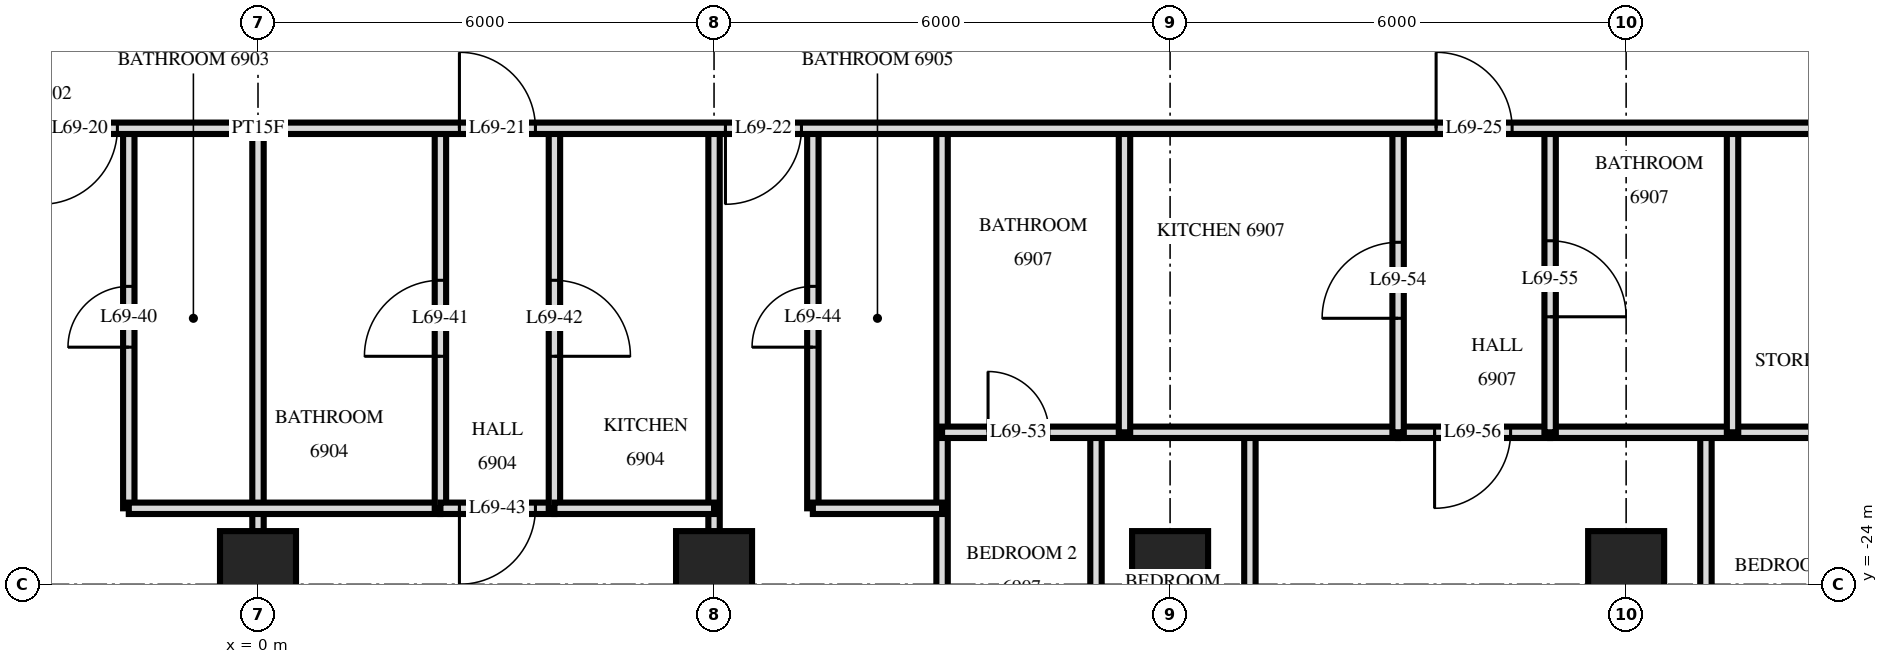
"""IFC4 building model, lengths in metres.
Left out: names, types, materials, properties, quantities, classifications, styles, units other than length and angle.
Written with IfcOpenShell. Run it as: python <this file> out.ifc"""

import sys

from ifc_helpers import new_model, si_unit, direction, frame, frame_2d, origin, origin_2d, place, context, subcontext, project, spatial, rectangle, extrude, element, fill, save


model = new_model("IFC4")
c1 = context("Model", 3, precision=1e-05, world=origin(), true_north=direction((0.0, 1.0)))
c2 = subcontext(c1, "Body", "Model", "MODEL_VIEW")
j1 = project(units=[si_unit("LENGTHUNIT", "METRE"), si_unit("PLANEANGLEUNIT", "RADIAN")], contexts=[c1])
p1 = place(None, origin())
s1 = spatial("IfcSite", under=j1, at=p1, CompositionType="ELEMENT")
p2 = place(p1, origin())
s2 = spatial("IfcBuilding", under=s1, at=p2, CompositionType="ELEMENT")
p3 = place(p2, frame((0.0, 0.0, 263.1)))
s3 = spatial("IfcBuildingStorey", under=s2, at=p3, CompositionType="ELEMENT", Elevation=263.1)
for number, where, z_axis, x_axis in (
    (1, (0.0, -23.8, 0.0), (0.0, 0.0, 1.0), (1.0, 0.0, 0.0)),
    (2, (6.0, -23.8, 0.0), (0.0, 0.0, 1.0), (1.0, 0.0, 0.0)),
    (3, (12.0, -23.8, 0.0), (0.0, 0.0, 1.0), (1.0, 0.0, 0.0)),
    (4, (18.0, -23.8, 0.0), (0.0, 0.0, 1.0), (1.0, 0.0, 0.0)),
):
    element("IfcColumn", number, at=place(p3, frame(where, z_axis=z_axis, x_axis=x_axis)), inside=s3, PredefinedType="COLUMN", context=c2, shape_type="SweptSolid", body=[
        extrude(rectangle(XDim=1.0, YDim=1.0, at=origin_2d()), origin(), (0.0, 0.0, 1.0), 3.5),
    ])
p4 = place(p3, frame((19.4, -22.0, 0.0), z_axis=(0.0, 0.0, 1.0), x_axis=(0.0, 1.0, 0.0)))
e5 = element("IfcWall", 5, at=p4, inside=s3, PredefinedType="PARTITIONING", context=c2, shape_type="SweptSolid", body=[
    extrude(rectangle(XDim=4.0, YDim=0.15, at=frame_2d((2.0, 0.0))), origin(), (0.0, 0.0, 1.0), 3.22),
])
p5 = place(p3, frame((19.05, -33.527, 0.0), z_axis=(0.0, 0.0, 1.0), x_axis=(0.0, 1.0, 0.0)))
e6 = element("IfcWall", 6, at=p5, inside=s3, PredefinedType="PARTITIONING", context=c2, shape_type="SweptSolid", body=[
    extrude(rectangle(XDim=11.527, YDim=0.15, at=frame_2d((5.764, 0.0))), origin(), (0.0, 0.0, 1.0), 3.22),
])
p6 = place(p5, frame((5.207, 0.0, 0.0)))
e7 = element("IfcOpeningElement", 7, at=p6, cuts=e6, PredefinedType="OPENING", context=c2, shape_type="SweptSolid", body=[
    extrude(rectangle(XDim=0.9, YDim=2.1, at=frame_2d((0.45, 1.05))), frame((0.0, 0.085, 0.0), z_axis=(0.0, -1.0, 0.0), x_axis=(1.0, 0.0, 0.0)), (0.0, 0.0, 1.0), 0.17),
])
p7 = place(p3, frame((17.0, -22.0, 0.0), z_axis=(0.0, 0.0, 1.0), x_axis=(0.0, 1.0, 0.0)))
e8 = element("IfcWall", 8, at=p7, inside=s3, PredefinedType="PARTITIONING", context=c2, shape_type="SweptSolid", body=[
    extrude(rectangle(XDim=4.0, YDim=0.15, at=frame_2d((2.0, 0.0))), origin(), (0.0, 0.0, 1.0), 3.22),
])
p8 = place(p7, frame((1.52, 0.0, 0.0)))
e9 = element("IfcOpeningElement", 9, at=p8, cuts=e8, PredefinedType="OPENING", context=c2, shape_type="SweptSolid", body=[
    extrude(rectangle(XDim=1.0, YDim=2.1, at=frame_2d((0.5, 1.05))), frame((0.0, 0.085, 0.0), z_axis=(0.0, -1.0, 0.0), x_axis=(1.0, 0.0, 0.0)), (0.0, 0.0, 1.0), 0.17),
])
p9 = place(p3, frame((15.0, -22.0, 0.0), z_axis=(0.0, 0.0, 1.0), x_axis=(0.0, 1.0, 0.0)))
e10 = element("IfcWall", 10, at=p9, inside=s3, PredefinedType="PARTITIONING", context=c2, shape_type="SweptSolid", body=[
    extrude(rectangle(XDim=4.0, YDim=0.15, at=frame_2d((2.0, 0.0))), origin(), (0.0, 0.0, 1.0), 3.22),
])
p10 = place(p9, frame((1.5, 0.0, 0.0)))
e11 = element("IfcOpeningElement", 11, at=p10, cuts=e10, PredefinedType="OPENING", context=c2, shape_type="SweptSolid", body=[
    extrude(rectangle(XDim=1.0, YDim=2.1, at=frame_2d((0.5, 1.05))), frame((0.0, 0.085, 0.0), z_axis=(0.0, -1.0, 0.0), x_axis=(1.0, 0.0, 0.0)), (0.0, 0.0, 1.0), 0.17),
])
p11 = place(p3, frame((13.05, -33.62, 0.0), z_axis=(0.0, 0.0, 1.0), x_axis=(0.0, 1.0, 0.0)))
e12 = element("IfcWall", 12, at=p11, inside=s3, PredefinedType="PARTITIONING", context=c2, shape_type="SweptSolid", body=[
    extrude(rectangle(XDim=11.62, YDim=0.15, at=frame_2d((5.81, 0.0))), origin(), (0.0, 0.0, 1.0), 3.22),
])
p12 = place(p11, frame((5.29, 0.0, 0.0)))
e13 = element("IfcOpeningElement", 13, at=p12, cuts=e12, PredefinedType="OPENING", context=c2, shape_type="SweptSolid", body=[
    extrude(rectangle(XDim=0.9, YDim=2.1, at=frame_2d((0.45, 1.05))), frame((0.0, 0.085, 0.0), z_axis=(0.0, -1.0, 0.0), x_axis=(1.0, 0.0, 0.0)), (0.0, 0.0, 1.0), 0.17),
])
p13 = place(p3, frame((11.4, -22.0, 0.0), z_axis=(0.0, 0.0, 1.0), x_axis=(0.0, 1.0, 0.0)))
e14 = element("IfcWall", 14, at=p13, inside=s3, PredefinedType="PARTITIONING", context=c2, shape_type="SweptSolid", body=[
    extrude(rectangle(XDim=4.0, YDim=0.15, at=frame_2d((2.0, 0.0))), origin(), (0.0, 0.0, 1.0), 3.22),
])
p14 = place(p3, frame((11.025, -33.62, 0.0), z_axis=(0.0, 0.0, 1.0), x_axis=(0.0, 1.0, 0.0)))
e15 = element("IfcWall", 15, at=p14, inside=s3, PredefinedType="PARTITIONING", context=c2, shape_type="SweptSolid", body=[
    extrude(rectangle(XDim=11.62, YDim=0.15, at=frame_2d((5.81, 0.0))), origin(), (0.0, 0.0, 1.0), 3.22),
])
p15 = place(p14, frame((5.29, 0.0, 0.0)))
e16 = element("IfcOpeningElement", 16, at=p15, cuts=e15, PredefinedType="OPENING", context=c2, shape_type="SweptSolid", body=[
    extrude(rectangle(XDim=0.9, YDim=2.1, at=frame_2d((0.45, 1.05))), frame((0.0, 0.085, 0.0), z_axis=(0.0, -1.0, 0.0), x_axis=(1.0, 0.0, 0.0)), (0.0, 0.0, 1.0), 0.17),
])
p16 = place(p3, frame((9.0, -33.62, 0.0), z_axis=(0.0, 0.0, 1.0), x_axis=(0.0, 1.0, 0.0)))
e17 = element("IfcWall", 17, at=p16, inside=s3, PredefinedType="PARTITIONING", context=c2, shape_type="SweptSolid", body=[
    extrude(rectangle(XDim=15.62, YDim=0.15, at=frame_2d((7.81, 0.0))), origin(), (0.0, 0.0, 1.0), 3.22),
])
p17 = place(p3, frame((7.3, -23.0, 0.0), z_axis=(0.0, 0.0, 1.0), x_axis=(0.0, 1.0, 0.0)))
e18 = element("IfcWall", 18, at=p17, inside=s3, PredefinedType="PARTITIONING", context=c2, shape_type="SweptSolid", body=[
    extrude(rectangle(XDim=5.0, YDim=0.15, at=frame_2d((2.5, 0.0))), origin(), (0.0, 0.0, 1.0), 3.22),
])
p18 = place(p17, frame((2.12, 0.0, 0.0)))
e19 = element("IfcOpeningElement", 19, at=p18, cuts=e18, PredefinedType="OPENING", context=c2, shape_type="SweptSolid", body=[
    extrude(rectangle(XDim=0.8, YDim=2.1, at=frame_2d((0.4, 1.05))), frame((0.0, 0.085, 0.0), z_axis=(0.0, -1.0, 0.0), x_axis=(1.0, 0.0, 0.0)), (0.0, 0.0, 1.0), 0.17),
])
p19 = place(p3, frame((6.0, -33.62, 0.0), z_axis=(0.0, 0.0, 1.0), x_axis=(0.0, 1.0, 0.0)))
e20 = element("IfcWall", 20, at=p19, inside=s3, PredefinedType="PARTITIONING", context=c2, shape_type="SweptSolid", body=[
    extrude(rectangle(XDim=15.62, YDim=0.15, at=frame_2d((7.81, 0.0))), origin(), (0.0, 0.0, 1.0), 3.22),
])
p20 = place(p3, frame((3.9, -23.0, 0.0), z_axis=(0.0, 0.0, 1.0), x_axis=(0.0, 1.0, 0.0)))
e21 = element("IfcWall", 21, at=p20, inside=s3, PredefinedType="PARTITIONING", context=c2, shape_type="SweptSolid", body=[
    extrude(rectangle(XDim=5.0, YDim=0.15, at=frame_2d((2.5, 0.0))), origin(), (0.0, 0.0, 1.0), 3.22),
])
p21 = place(p20, frame((2.0, 0.0, 0.0)))
e22 = element("IfcOpeningElement", 22, at=p21, cuts=e21, PredefinedType="OPENING", context=c2, shape_type="SweptSolid", body=[
    extrude(rectangle(XDim=1.0, YDim=2.1, at=frame_2d((0.5, 1.05))), frame((0.0, 0.085, 0.0), z_axis=(0.0, -1.0, 0.0), x_axis=(1.0, 0.0, 0.0)), (0.0, 0.0, 1.0), 0.17),
])
p22 = place(p3, frame((2.4, -23.0, 0.0), z_axis=(0.0, 0.0, 1.0), x_axis=(0.0, 1.0, 0.0)))
e23 = element("IfcWall", 23, at=p22, inside=s3, PredefinedType="PARTITIONING", context=c2, shape_type="SweptSolid", body=[
    extrude(rectangle(XDim=5.0, YDim=0.15, at=frame_2d((2.5, 0.0))), origin(), (0.0, 0.0, 1.0), 3.22),
])
p23 = place(p22, frame((2.0, 0.0, 0.0)))
e24 = element("IfcOpeningElement", 24, at=p23, cuts=e23, PredefinedType="OPENING", context=c2, shape_type="SweptSolid", body=[
    extrude(rectangle(XDim=1.0, YDim=2.1, at=frame_2d((0.5, 1.05))), frame((0.0, 0.085, 0.0), z_axis=(0.0, -1.0, 0.0), x_axis=(1.0, 0.0, 0.0)), (0.0, 0.0, 1.0), 0.17),
])
p24 = place(p3, frame((0.0, -33.62, 0.0), z_axis=(0.0, 0.0, 1.0), x_axis=(0.0, 1.0, 0.0)))
e25 = element("IfcWall", 25, at=p24, inside=s3, PredefinedType="PARTITIONING", context=c2, shape_type="SweptSolid", body=[
    extrude(rectangle(XDim=15.62, YDim=0.15, at=frame_2d((7.81, 0.0))), origin(), (0.0, 0.0, 1.0), 3.22),
])
p25 = place(p3, frame((-1.7, -23.0, 0.0), z_axis=(0.0, 0.0, 1.0), x_axis=(0.0, 1.0, 0.0)))
e26 = element("IfcWall", 26, at=p25, inside=s3, PredefinedType="PARTITIONING", context=c2, shape_type="SweptSolid", body=[
    extrude(rectangle(XDim=5.0, YDim=0.15, at=frame_2d((2.5, 0.0))), origin(), (0.0, 0.0, 1.0), 3.22),
])
p26 = place(p25, frame((2.12, 0.0, 0.0)))
e27 = element("IfcOpeningElement", 27, at=p26, cuts=e26, PredefinedType="OPENING", context=c2, shape_type="SweptSolid", body=[
    extrude(rectangle(XDim=0.8, YDim=2.1, at=frame_2d((0.4, 1.05))), frame((0.0, 0.085, 0.0), z_axis=(0.0, -1.0, 0.0), x_axis=(1.0, 0.0, 0.0)), (0.0, 0.0, 1.0), 0.17),
])
p27 = place(p3, frame((2.4, -23.0, 0.0), z_axis=(0.0, 0.0, 1.0), x_axis=(1.0, 0.0, 0.0)))
e28 = element("IfcWall", 28, at=p27, inside=s3, PredefinedType="PARTITIONING", context=c2, shape_type="SweptSolid", body=[
    extrude(rectangle(XDim=1.5, YDim=0.15, at=frame_2d((0.75, 0.0))), origin(), (0.0, 0.0, 1.0), 3.22),
])
p28 = place(p27, frame((0.25, 0.0, 0.0)))
e29 = element("IfcOpeningElement", 29, at=p28, cuts=e28, PredefinedType="OPENING", context=c2, shape_type="SweptSolid", body=[
    extrude(rectangle(XDim=1.0, YDim=2.1, at=frame_2d((0.5, 1.05))), frame((0.0, 0.085, 0.0), z_axis=(0.0, -1.0, 0.0), x_axis=(1.0, 0.0, 0.0)), (0.0, 0.0, 1.0), 0.17),
])
p29 = place(p3, frame((-1.7, -23.0, 0.0), z_axis=(0.0, 0.0, 1.0), x_axis=(1.0, 0.0, 0.0)))
e30 = element("IfcWall", 30, at=p29, inside=s3, PredefinedType="PARTITIONING", context=c2, shape_type="SweptSolid", body=[
    extrude(rectangle(XDim=4.1, YDim=0.15, at=frame_2d((2.05, 0.0))), origin(), (0.0, 0.0, 1.0), 3.22),
])
p30 = place(p3, frame((3.9, -23.0, 0.0), z_axis=(0.0, 0.0, 1.0), x_axis=(1.0, 0.0, 0.0)))
e31 = element("IfcWall", 31, at=p30, inside=s3, PredefinedType="PARTITIONING", context=c2, shape_type="SweptSolid", body=[
    extrude(rectangle(XDim=2.1, YDim=0.15, at=frame_2d((1.05, 0.0))), origin(), (0.0, 0.0, 1.0), 3.22),
])
p31 = place(p3, frame((7.3, -23.0, 0.0), z_axis=(0.0, 0.0, 1.0), x_axis=(1.0, 0.0, 0.0)))
e32 = element("IfcWall", 32, at=p31, inside=s3, PredefinedType="PARTITIONING", context=c2, shape_type="SweptSolid", body=[
    extrude(rectangle(XDim=1.7, YDim=0.15, at=frame_2d((0.85, 0.0))), origin(), (0.0, 0.0, 1.0), 3.22),
])
p32 = place(p3, frame((15.0, -22.0, 0.0), z_axis=(0.0, 0.0, 1.0), x_axis=(1.0, 0.0, 0.0)))
e33 = element("IfcWall", 33, at=p32, inside=s3, PredefinedType="PARTITIONING", context=c2, shape_type="SweptSolid", body=[
    extrude(rectangle(XDim=2.0, YDim=0.15, at=frame_2d((1.0, 0.0))), origin(), (0.0, 0.0, 1.0), 3.22),
])
p33 = place(p32, frame((0.48, 0.0, 0.0)))
e34 = element("IfcOpeningElement", 34, at=p33, cuts=e33, PredefinedType="OPENING", context=c2, shape_type="SweptSolid", body=[
    extrude(rectangle(XDim=1.0, YDim=2.1, at=frame_2d((0.5, 1.05))), frame((0.0, 0.085, 0.0), z_axis=(0.0, -1.0, 0.0), x_axis=(1.0, 0.0, 0.0)), (0.0, 0.0, 1.0), 0.17),
])
p34 = place(p3, frame((9.0, -22.0, 0.0), z_axis=(0.0, 0.0, 1.0), x_axis=(1.0, 0.0, 0.0)))
e35 = element("IfcWall", 35, at=p34, inside=s3, PredefinedType="PARTITIONING", context=c2, shape_type="SweptSolid", body=[
    extrude(rectangle(XDim=6.0, YDim=0.15, at=frame_2d((3.0, 0.0))), origin(), (0.0, 0.0, 1.0), 3.22),
])
p35 = place(p34, frame((0.605, 0.0, 0.0)))
e36 = element("IfcOpeningElement", 36, at=p35, cuts=e35, PredefinedType="OPENING", context=c2, shape_type="SweptSolid", body=[
    extrude(rectangle(XDim=0.8, YDim=2.1, at=frame_2d((0.4, 1.05))), frame((0.0, 0.085, 0.0), z_axis=(0.0, -1.0, 0.0), x_axis=(1.0, 0.0, 0.0)), (0.0, 0.0, 1.0), 0.17),
])
p36 = place(p3, frame((17.0, -22.0, 0.0), z_axis=(0.0, 0.0, 1.0), x_axis=(1.0, 0.0, 0.0)))
e37 = element("IfcWall", 37, at=p36, inside=s3, PredefinedType="PARTITIONING", context=c2, shape_type="SweptSolid", body=[
    extrude(rectangle(XDim=5.92, YDim=0.15, at=frame_2d((2.96, 0.0))), origin(), (0.0, 0.0, 1.0), 3.22),
])
p37 = place(p3, frame((-22.92, -18.0, 0.0), z_axis=(0.0, 0.0, 1.0), x_axis=(1.0, 0.0, 0.0)))
e38 = element("IfcWall", 38, at=p37, inside=s3, PredefinedType="PARTITIONING", context=c2, shape_type="SweptSolid", body=[
    extrude(rectangle(XDim=45.84, YDim=0.15, at=frame_2d((22.92, 0.0))), origin(), (0.0, 0.0, 1.0), 3.22),
])
p38 = place(p37, frame((14.07, 0.0, 0.0)))
e39 = element("IfcOpeningElement", 39, at=p38, cuts=e38, PredefinedType="OPENING", context=c2, shape_type="SweptSolid", body=[
    extrude(rectangle(XDim=1.0, YDim=2.1, at=frame_2d((0.5, 1.05))), frame((0.0, 0.085, 0.0), z_axis=(0.0, -1.0, 0.0), x_axis=(1.0, 0.0, 0.0)), (0.0, 0.0, 1.0), 0.17),
])
p39 = place(p37, frame((18.77, 0.0, 0.0)))
e40 = element("IfcOpeningElement", 40, at=p39, cuts=e38, PredefinedType="OPENING", context=c2, shape_type="SweptSolid", body=[
    extrude(rectangle(XDim=1.0, YDim=2.1, at=frame_2d((0.5, 1.05))), frame((0.0, 0.085, 0.0), z_axis=(0.0, -1.0, 0.0), x_axis=(1.0, 0.0, 0.0)), (0.0, 0.0, 1.0), 0.17),
])
p40 = place(p37, frame((20.07, 0.0, 0.0)))
e41 = element("IfcOpeningElement", 41, at=p40, cuts=e38, PredefinedType="OPENING", context=c2, shape_type="SweptSolid", body=[
    extrude(rectangle(XDim=1.0, YDim=2.1, at=frame_2d((0.5, 1.05))), frame((0.0, 0.085, 0.0), z_axis=(0.0, -1.0, 0.0), x_axis=(1.0, 0.0, 0.0)), (0.0, 0.0, 1.0), 0.17),
])
p41 = place(p37, frame((25.57, 0.0, 0.0)))
e42 = element("IfcOpeningElement", 42, at=p41, cuts=e38, PredefinedType="OPENING", context=c2, shape_type="SweptSolid", body=[
    extrude(rectangle(XDim=1.0, YDim=2.1, at=frame_2d((0.5, 1.05))), frame((0.0, 0.085, 0.0), z_axis=(0.0, -1.0, 0.0), x_axis=(1.0, 0.0, 0.0)), (0.0, 0.0, 1.0), 0.17),
])
p42 = place(p37, frame((29.07, 0.0, 0.0)))
e43 = element("IfcOpeningElement", 43, at=p42, cuts=e38, PredefinedType="OPENING", context=c2, shape_type="SweptSolid", body=[
    extrude(rectangle(XDim=1.0, YDim=2.1, at=frame_2d((0.5, 1.05))), frame((0.0, 0.085, 0.0), z_axis=(0.0, -1.0, 0.0), x_axis=(1.0, 0.0, 0.0)), (0.0, 0.0, 1.0), 0.17),
])
p43 = place(p37, frame((6.42, 0.0, 0.0)))
e44 = element("IfcOpeningElement", 44, at=p43, cuts=e38, PredefinedType="OPENING", context=c2, shape_type="SweptSolid", body=[
    extrude(rectangle(XDim=1.0, YDim=2.1, at=frame_2d((0.5, 1.05))), frame((0.0, 0.085, 0.0), z_axis=(0.0, -1.0, 0.0), x_axis=(1.0, 0.0, 0.0)), (0.0, 0.0, 1.0), 0.17),
])
p44 = place(p37, frame((1.17, 0.0, 0.0)))
e45 = element("IfcOpeningElement", 45, at=p44, cuts=e38, PredefinedType="OPENING", context=c2, shape_type="SweptSolid", body=[
    extrude(rectangle(XDim=1.0, YDim=2.1, at=frame_2d((0.5, 1.05))), frame((0.0, 0.085, 0.0), z_axis=(0.0, -1.0, 0.0), x_axis=(1.0, 0.0, 0.0)), (0.0, 0.0, 1.0), 0.17),
])
p45 = place(p37, frame((38.42, 0.0, 0.0)))
e46 = element("IfcOpeningElement", 46, at=p45, cuts=e38, PredefinedType="OPENING", context=c2, shape_type="SweptSolid", body=[
    extrude(rectangle(XDim=1.0, YDim=2.1, at=frame_2d((0.5, 1.05))), frame((0.0, 0.085, 0.0), z_axis=(0.0, -1.0, 0.0), x_axis=(1.0, 0.0, 0.0)), (0.0, 0.0, 1.0), 0.17),
])
p46 = place(p37, frame((43.67, 0.0, 0.0)))
e47 = element("IfcOpeningElement", 47, at=p46, cuts=e38, PredefinedType="OPENING", context=c2, shape_type="SweptSolid", body=[
    extrude(rectangle(XDim=1.0, YDim=2.1, at=frame_2d((0.5, 1.05))), frame((0.0, 0.085, 0.0), z_axis=(0.0, -1.0, 0.0), x_axis=(1.0, 0.0, 0.0)), (0.0, 0.0, 1.0), 0.17),
])
p47 = place(p40, frame((0.5, 0.0, 0.0), z_axis=(0.0, 0.0, 1.0), x_axis=(-1.0, 0.0, 0.0)))
e48 = element("IfcDoor", 48, at=p47, inside=s3, OperationType="SINGLE_SWING_LEFT", PredefinedType="DOOR", context=c2, shape_type="SweptSolid", body=[
    extrude(rectangle(XDim=1.0, YDim=2.1, at=frame_2d((0.0, 1.05))), frame((0.0, -0.025, 0.0), z_axis=(0.0, 1.0, 0.0), x_axis=(-1.0, 0.0, 0.0)), (0.0, 0.0, 1.0), 0.05),
])
fill(e41, e48)
p48 = place(p41, origin())
e49 = element("IfcDoor", 49, at=p48, inside=s3, OperationType="SINGLE_SWING_RIGHT", PredefinedType="DOOR", context=c2, shape_type="SweptSolid", body=[
    extrude(rectangle(XDim=1.0, YDim=2.1, at=frame_2d((0.5, 1.05))), frame((0.0, 0.025, 0.0), z_axis=(0.0, -1.0, 0.0), x_axis=(1.0, 0.0, 0.0)), (0.0, 0.0, 1.0), 0.05),
])
fill(e42, e49)
p49 = place(p42, frame((0.5, 0.0, 0.0), z_axis=(0.0, 0.0, 1.0), x_axis=(-1.0, 0.0, 0.0)))
e50 = element("IfcDoor", 50, at=p49, inside=s3, OperationType="SINGLE_SWING_LEFT", PredefinedType="DOOR", context=c2, shape_type="SweptSolid", body=[
    extrude(rectangle(XDim=1.0, YDim=2.1, at=frame_2d((0.0, 1.05))), frame((0.0, -0.025, 0.0), z_axis=(0.0, 1.0, 0.0), x_axis=(-1.0, 0.0, 0.0)), (0.0, 0.0, 1.0), 0.05),
])
fill(e43, e50)
p50 = place(p45, origin())
e51 = element("IfcDoor", 51, at=p50, inside=s3, OperationType="SINGLE_SWING_RIGHT", PredefinedType="DOOR", context=c2, shape_type="SweptSolid", body=[
    extrude(rectangle(XDim=1.0, YDim=2.1, at=frame_2d((0.5, 1.05))), frame((0.0, 0.025, 0.0), z_axis=(0.0, -1.0, 0.0), x_axis=(1.0, 0.0, 0.0)), (0.0, 0.0, 1.0), 0.05),
])
fill(e46, e51)
p51 = place(p26, origin())
e52 = element("IfcDoor", 52, at=p51, inside=s3, OperationType="SINGLE_SWING_RIGHT", PredefinedType="DOOR", context=c2, shape_type="SweptSolid", body=[
    extrude(rectangle(XDim=0.8, YDim=2.1, at=frame_2d((0.4, 1.05))), frame((0.0, 0.025, 0.0), z_axis=(0.0, -1.0, 0.0), x_axis=(1.0, 0.0, 0.0)), (0.0, 0.0, 1.0), 0.05),
])
fill(e27, e52)
p52 = place(p23, origin())
e53 = element("IfcDoor", 53, at=p52, inside=s3, OperationType="SINGLE_SWING_RIGHT", PredefinedType="DOOR", context=c2, shape_type="SweptSolid", body=[
    extrude(rectangle(XDim=1.0, YDim=2.1, at=frame_2d((0.5, 1.05))), frame((0.0, 0.025, 0.0), z_axis=(0.0, -1.0, 0.0), x_axis=(1.0, 0.0, 0.0)), (0.0, 0.0, 1.0), 0.05),
])
fill(e24, e53)
p53 = place(p21, frame((0.5, 0.0, 0.0), z_axis=(0.0, 0.0, 1.0), x_axis=(-1.0, 0.0, 0.0)))
e54 = element("IfcDoor", 54, at=p53, inside=s3, OperationType="SINGLE_SWING_LEFT", PredefinedType="DOOR", context=c2, shape_type="SweptSolid", body=[
    extrude(rectangle(XDim=1.0, YDim=2.1, at=frame_2d((0.0, 1.05))), frame((0.0, -0.025, 0.0), z_axis=(0.0, 1.0, 0.0), x_axis=(-1.0, 0.0, 0.0)), (0.0, 0.0, 1.0), 0.05),
])
fill(e22, e54)
p54 = place(p28, frame((0.5, 0.0, 0.0), z_axis=(0.0, 0.0, 1.0), x_axis=(-1.0, 0.0, 0.0)))
e55 = element("IfcDoor", 55, at=p54, inside=s3, OperationType="SINGLE_SWING_LEFT", PredefinedType="DOOR", context=c2, shape_type="SweptSolid", body=[
    extrude(rectangle(XDim=1.0, YDim=2.1, at=frame_2d((0.0, 1.05))), frame((0.0, -0.025, 0.0), z_axis=(0.0, 1.0, 0.0), x_axis=(-1.0, 0.0, 0.0)), (0.0, 0.0, 1.0), 0.05),
])
fill(e29, e55)
p55 = place(p18, origin())
e56 = element("IfcDoor", 56, at=p55, inside=s3, OperationType="SINGLE_SWING_RIGHT", PredefinedType="DOOR", context=c2, shape_type="SweptSolid", body=[
    extrude(rectangle(XDim=0.8, YDim=2.1, at=frame_2d((0.4, 1.05))), frame((0.0, 0.025, 0.0), z_axis=(0.0, -1.0, 0.0), x_axis=(1.0, 0.0, 0.0)), (0.0, 0.0, 1.0), 0.05),
])
fill(e19, e56)
p56 = place(p35, origin())
e57 = element("IfcDoor", 57, at=p56, inside=s3, OperationType="SINGLE_SWING_RIGHT", PredefinedType="DOOR", context=c2, shape_type="SweptSolid", body=[
    extrude(rectangle(XDim=0.8, YDim=2.1, at=frame_2d((0.4, 1.05))), frame((0.0, 0.025, 0.0), z_axis=(0.0, -1.0, 0.0), x_axis=(1.0, 0.0, 0.0)), (0.0, 0.0, 1.0), 0.05),
])
fill(e36, e57)
p57 = place(p10, origin())
e58 = element("IfcDoor", 58, at=p57, inside=s3, OperationType="SINGLE_SWING_RIGHT", PredefinedType="DOOR", context=c2, shape_type="SweptSolid", body=[
    extrude(rectangle(XDim=1.0, YDim=2.1, at=frame_2d((0.5, 1.05))), frame((0.0, 0.025, 0.0), z_axis=(0.0, -1.0, 0.0), x_axis=(1.0, 0.0, 0.0)), (0.0, 0.0, 1.0), 0.05),
])
fill(e11, e58)
p58 = place(p8, frame((0.5, 0.0, 0.0), z_axis=(0.0, 0.0, 1.0), x_axis=(-1.0, 0.0, 0.0)))
e59 = element("IfcDoor", 59, at=p58, inside=s3, OperationType="SINGLE_SWING_LEFT", PredefinedType="DOOR", context=c2, shape_type="SweptSolid", body=[
    extrude(rectangle(XDim=1.0, YDim=2.1, at=frame_2d((0.0, 1.05))), frame((0.0, -0.025, 0.0), z_axis=(0.0, 1.0, 0.0), x_axis=(-1.0, 0.0, 0.0)), (0.0, 0.0, 1.0), 0.05),
])
fill(e9, e59)
p59 = place(p33, frame((0.5, 0.0, 0.0), z_axis=(0.0, 0.0, 1.0), x_axis=(-1.0, 0.0, 0.0)))
e60 = element("IfcDoor", 60, at=p59, inside=s3, OperationType="SINGLE_SWING_LEFT", PredefinedType="DOOR", context=c2, shape_type="SweptSolid", body=[
    extrude(rectangle(XDim=1.0, YDim=2.1, at=frame_2d((0.0, 1.05))), frame((0.0, -0.025, 0.0), z_axis=(0.0, 1.0, 0.0), x_axis=(-1.0, 0.0, 0.0)), (0.0, 0.0, 1.0), 0.05),
])
fill(e34, e60)
save(model, sys.argv[1])
